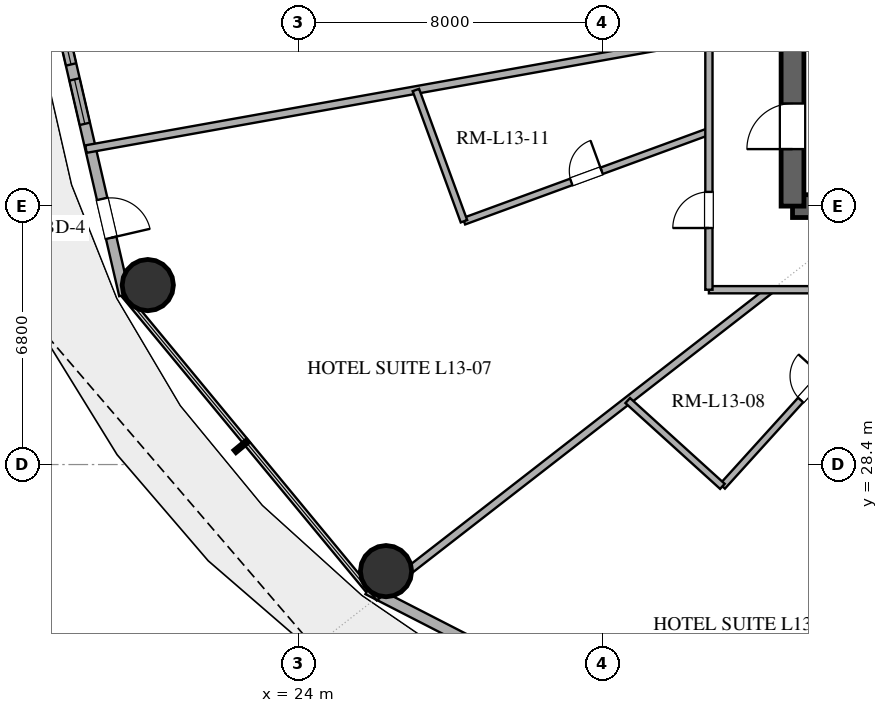
"""IFC4 building model, lengths in metres.
Left out: names, types, materials, properties, quantities, classifications, styles, units other than length and angle.
Written with IfcOpenShell. Run it as: python <this file> out.ifc"""

import sys

from ifc_helpers import new_model, si_unit, direction, frame, frame_2d, origin, origin_2d, place, context, subcontext, project, spatial, rectangle, hollow_circle, extrude, element, fill, save


model = new_model("IFC4")
c1 = context("Model", 3, precision=1e-05, world=origin(), true_north=direction((0.0, 1.0)))
c2 = subcontext(c1, "Body", "Model", "MODEL_VIEW")
j1 = project(units=[si_unit("LENGTHUNIT", "METRE"), si_unit("PLANEANGLEUNIT", "RADIAN")], contexts=[c1])
p1 = place(None, origin())
s1 = spatial("IfcSite", under=j1, at=p1, CompositionType="ELEMENT")
p2 = place(p1, origin())
s2 = spatial("IfcBuilding", under=s1, at=p2, CompositionType="ELEMENT")
p3 = place(p2, frame((0.0, 0.0, 57.0)))
s3 = spatial("IfcBuildingStorey", under=s2, at=p3, CompositionType="ELEMENT", Elevation=57.0)
p4 = place(p3, frame((37.0, 35.2, 0.0), z_axis=(0.0, 0.0, 1.0), x_axis=(1.0, 0.0, 0.0)))
e1 = element("IfcWall", 1, at=p4, inside=s3, PredefinedType="SHEAR", context=c2, shape_type="SweptSolid", body=[
    extrude(rectangle(XDim=4.0, YDim=0.6, at=frame_2d((2.0, 0.0))), origin(), (0.0, 0.0, 1.0), 3.38),
])
p5 = place(p3, frame((37.0, 35.2, 0.0), z_axis=(0.0, 0.0, 1.0), x_axis=(0.0, 1.0, 0.0)))
e2 = element("IfcWall", 2, at=p5, inside=s3, PredefinedType="SHEAR", context=c2, shape_type="SweptSolid", body=[
    extrude(rectangle(XDim=13.6, YDim=0.6, at=frame_2d((6.8, 0.0))), origin(), (0.0, 0.0, 1.0), 3.38),
])
p6 = place(p5, frame((1.5, 0.0, 0.0)))
e3 = element("IfcOpeningElement", 3, at=p6, cuts=e2, PredefinedType="OPENING", context=c2, shape_type="SweptSolid", body=[
    extrude(rectangle(XDim=1.2, YDim=2.15, at=frame_2d((0.6, 1.075))), frame((0.0, 0.31, 0.0), z_axis=(0.0, -1.0, 0.0), x_axis=(1.0, 0.0, 0.0)), (0.0, 0.0, 1.0), 0.62),
])
for number, where, z_axis, x_axis in (
    (4, (20.034, 33.122, 0.0), (0.0, 0.0, 1.0), (1.0, 0.0, 0.0)),
    (5, (26.303, 25.595, 0.0), (0.0, 0.0, 1.0), (1.0, 0.0, 0.0)),
):
    element("IfcColumn", number, at=place(p3, frame(where, z_axis=z_axis, x_axis=x_axis)), inside=s3, PredefinedType="COLUMN", context=c2, shape_type="SweptSolid", body=[
        extrude(hollow_circle(Radius=0.675, WallThickness=0.036, at=origin_2d()), origin(), (0.0, 0.0, 1.0), 3.38),
    ])
p7 = place(p3, frame((17.304, 42.0, 0.0), z_axis=(0.0, 0.0, 1.0), x_axis=(0.225454452941, -0.974253709076, 0.0)))
e6 = element("IfcWall", 6, at=p7, inside=s3, PredefinedType="SOLIDWALL", context=c2, shape_type="SweptSolid", body=[
    extrude(rectangle(XDim=9.38, YDim=0.28, at=frame_2d((4.69, 0.0))), origin(), (0.0, 0.0, 1.0), 3.38),
])
p8 = place(p7, frame((1.953, 0.0, 0.85)))
e7 = element("IfcOpeningElement", 7, at=p8, cuts=e6, PredefinedType="OPENING", context=c2, shape_type="SweptSolid", body=[
    extrude(rectangle(XDim=1.2, YDim=1.8, at=frame_2d((0.6, 0.9))), frame((0.0, 0.15, 0.0), z_axis=(0.0, -1.0, 0.0), x_axis=(1.0, 0.0, 0.0)), (0.0, 0.0, 1.0), 0.3),
])
p9 = place(p7, frame((3.558, 0.0, 0.85)))
e8 = element("IfcOpeningElement", 8, at=p9, cuts=e6, PredefinedType="OPENING", context=c2, shape_type="SweptSolid", body=[
    extrude(rectangle(XDim=1.2, YDim=1.8, at=frame_2d((0.6, 0.9))), frame((0.0, 0.15, 0.0), z_axis=(0.0, -1.0, 0.0), x_axis=(1.0, 0.0, 0.0)), (0.0, 0.0, 1.0), 0.3),
])
p10 = place(p7, frame((6.785, 0.0, 0.0)))
e9 = element("IfcOpeningElement", 9, at=p10, cuts=e6, PredefinedType="OPENING", context=c2, shape_type="SweptSolid", body=[
    extrude(rectangle(XDim=1.05, YDim=2.2, at=frame_2d((0.525, 1.1))), frame((0.0, 0.15, 0.0), z_axis=(0.0, -1.0, 0.0), x_axis=(1.0, 0.0, 0.0)), (0.0, 0.0, 1.0), 0.3),
])
p11 = place(p3, frame((25.826, 25.114, 0.0), z_axis=(0.0, 0.0, 1.0), x_axis=(0.889853976658, -0.456245438581, 0.0)))
e10 = element("IfcWall", 10, at=p11, inside=s3, PredefinedType="SOLIDWALL", context=c2, shape_type="SweptSolid", body=[
    extrude(rectangle(XDim=11.346, YDim=0.28, at=frame_2d((5.673, 0.0))), origin(), (0.0, 0.0, 1.0), 3.38),
])
p12 = place(p11, frame((2.967, 0.0, 0.85)))
e11 = element("IfcOpeningElement", 11, at=p12, cuts=e10, PredefinedType="OPENING", context=c2, shape_type="SweptSolid", body=[
    extrude(rectangle(XDim=2.1, YDim=2.2, at=frame_2d((1.05, 1.1))), frame((0.0, 0.15, 0.0), z_axis=(0.0, -1.0, 0.0), x_axis=(1.0, 0.0, 0.0)), (0.0, 0.0, 1.0), 0.3),
])
p13 = place(p11, frame((6.429, 0.0, 0.85)))
e12 = element("IfcOpeningElement", 12, at=p13, cuts=e10, PredefinedType="OPENING", context=c2, shape_type="SweptSolid", body=[
    extrude(rectangle(XDim=2.1, YDim=2.2, at=frame_2d((1.05, 1.1))), frame((0.0, 0.15, 0.0), z_axis=(0.0, -1.0, 0.0), x_axis=(1.0, 0.0, 0.0)), (0.0, 0.0, 1.0), 0.3),
])
p14 = place(p3, frame((34.8, 39.636, 0.0), z_axis=(0.0, 0.0, 1.0), x_axis=(-0.984338200058, -0.176290407871, 0.0)))
e13 = element("IfcWall", 13, at=p14, inside=s3, PredefinedType="PARTITIONING", context=c2, shape_type="SweptSolid", body=[
    extrude(rectangle(XDim=16.653, YDim=0.2, at=frame_2d((8.327, 0.0))), origin(), (0.0, 0.0, 1.0), 2.74),
])
p15 = place(p3, frame((36.417, 33.0, 0.0), z_axis=(0.0, 0.0, 1.0), x_axis=(-0.789656987139, -0.613548565855, 0.0)))
e14 = element("IfcWall", 14, at=p15, inside=s3, PredefinedType="PARTITIONING", context=c2, shape_type="SweptSolid", body=[
    extrude(rectangle(XDim=13.195, YDim=0.2, at=frame_2d((6.597, 0.0))), origin(), (0.0, 0.0, 1.0), 2.74),
])
p16 = place(p3, frame((35.155, 27.826, 0.0), z_axis=(0.0, 0.0, 1.0), x_axis=(0.671533822983, 0.740973902773, 0.0)))
e15 = element("IfcWall", 15, at=p16, inside=s3, PredefinedType="PLUMBINGWALL", context=c2, shape_type="SweptSolid", body=[
    extrude(rectangle(XDim=6.982, YDim=0.18, at=frame_2d((3.491, 0.0))), origin(), (0.0, 0.0, 1.0), 2.74),
])
p17 = place(p16, frame((3.066, 0.0, 0.0)))
e16 = element("IfcOpeningElement", 16, at=p17, cuts=e15, PredefinedType="OPENING", context=c2, shape_type="SweptSolid", body=[
    extrude(rectangle(XDim=0.85, YDim=2.1, at=frame_2d((0.425, 1.05))), frame((0.0, 0.1, 0.0), z_axis=(0.0, -1.0, 0.0), x_axis=(1.0, 0.0, 0.0)), (0.0, 0.0, 1.0), 0.2),
])
p18 = place(p3, frame((28.354, 34.802, 0.0), z_axis=(0.0, 0.0, 1.0), x_axis=(0.938953689431, 0.344043556986, 0.0)))
e17 = element("IfcWall", 17, at=p18, inside=s3, PredefinedType="PLUMBINGWALL", context=c2, shape_type="SweptSolid", body=[
    extrude(rectangle(XDim=6.865, YDim=0.18, at=frame_2d((3.433, 0.0))), origin(), (0.0, 0.0, 1.0), 2.74),
])
p19 = place(p18, frame((3.007, 0.0, 0.0)))
e18 = element("IfcOpeningElement", 18, at=p19, cuts=e17, PredefinedType="OPENING", context=c2, shape_type="SweptSolid", body=[
    extrude(rectangle(XDim=0.85, YDim=2.1, at=frame_2d((0.425, 1.05))), frame((0.0, 0.1, 0.0), z_axis=(0.0, -1.0, 0.0), x_axis=(1.0, 0.0, 0.0)), (0.0, 0.0, 1.0), 0.2),
])
p20 = place(p3, frame((50.144, 33.0, 0.0), z_axis=(0.0, 0.0, 1.0), x_axis=(-1.0, 0.0, 0.0)))
e19 = element("IfcWall", 19, at=p20, inside=s3, PredefinedType="PARTITIONING", context=c2, shape_type="SweptSolid", body=[
    extrude(rectangle(XDim=15.344, YDim=0.19, at=frame_2d((7.672, 0.0))), origin(), (0.0, 0.0, 1.0), 2.74),
])
p21 = place(p20, frame((3.438, 0.0, 0.0)))
e20 = element("IfcOpeningElement", 20, at=p21, cuts=e19, PredefinedType="OPENING", context=c2, shape_type="SweptSolid", body=[
    extrude(rectangle(XDim=1.0, YDim=2.2, at=frame_2d((0.5, 1.1))), frame((0.0, 0.105, 0.0), z_axis=(0.0, -1.0, 0.0), x_axis=(1.0, 0.0, 0.0)), (0.0, 0.0, 1.0), 0.21),
])
p22 = place(p20, frame((7.798, 0.0, 0.0)))
e21 = element("IfcOpeningElement", 21, at=p22, cuts=e19, PredefinedType="OPENING", context=c2, shape_type="SweptSolid", body=[
    extrude(rectangle(XDim=0.95, YDim=2.15, at=frame_2d((0.475, 1.075))), frame((0.0, 0.105, 0.0), z_axis=(0.0, -1.0, 0.0), x_axis=(1.0, 0.0, 0.0)), (0.0, 0.0, 1.0), 0.21),
])
p23 = place(p3, frame((34.8, 33.0, 0.0), z_axis=(0.0, 0.0, 1.0), x_axis=(0.0, 1.0, 0.0)))
e22 = element("IfcWall", 22, at=p23, inside=s3, PredefinedType="PARTITIONING", context=c2, shape_type="SweptSolid", body=[
    extrude(rectangle(XDim=6.668, YDim=0.19, at=frame_2d((3.334, 0.0))), origin(), (0.0, 0.0, 1.0), 2.74),
])
p24 = place(p23, frame((1.624, 0.0, 0.0)))
e23 = element("IfcOpeningElement", 23, at=p24, cuts=e22, PredefinedType="OPENING", context=c2, shape_type="SweptSolid", body=[
    extrude(rectangle(XDim=0.95, YDim=2.15, at=frame_2d((0.475, 1.075))), frame((0.0, 0.105, 0.0), z_axis=(0.0, -1.0, 0.0), x_axis=(1.0, 0.0, 0.0)), (0.0, 0.0, 1.0), 0.21),
])
p25 = place(p3, frame((27.089, 38.255, 0.0), z_axis=(0.0, 0.0, 1.0), x_axis=(0.344012760863, -0.938964972916, 0.0)))
e24 = element("IfcWall", 24, at=p25, inside=s3, PredefinedType="PLUMBINGWALL", context=c2, shape_type="SweptSolid", body=[
    extrude(rectangle(XDim=3.677, YDim=0.18, at=frame_2d((1.839, 0.0))), origin(), (0.0, 0.0, 1.0), 2.74),
])
p26 = place(p3, frame((32.664, 30.084, 0.0), z_axis=(0.0, 0.0, 1.0), x_axis=(0.740964368308, -0.67154434321, 0.0)))
e25 = element("IfcWall", 25, at=p26, inside=s3, PredefinedType="PLUMBINGWALL", context=c2, shape_type="SweptSolid", body=[
    extrude(rectangle(XDim=3.362, YDim=0.18, at=frame_2d((1.681, 0.0))), origin(), (0.0, 0.0, 1.0), 2.74),
])
p27 = place(p8, origin())
e26 = element("IfcWindow", 26, at=p27, inside=s3, PartitioningType="SINGLE_PANEL", PredefinedType="WINDOW", context=c2, shape_type="SweptSolid", body=[
    extrude(rectangle(XDim=1.2, YDim=1.8, at=frame_2d((0.6, 0.9))), frame((0.0, 0.03, 0.0), z_axis=(0.0, -1.0, 0.0), x_axis=(1.0, 0.0, 0.0)), (0.0, 0.0, 1.0), 0.06),
])
fill(e7, e26)
p28 = place(p9, origin())
e27 = element("IfcWindow", 27, at=p28, inside=s3, PartitioningType="SINGLE_PANEL", PredefinedType="WINDOW", context=c2, shape_type="SweptSolid", body=[
    extrude(rectangle(XDim=1.2, YDim=1.8, at=frame_2d((0.6, 0.9))), frame((0.0, 0.03, 0.0), z_axis=(0.0, -1.0, 0.0), x_axis=(1.0, 0.0, 0.0)), (0.0, 0.0, 1.0), 0.06),
])
fill(e8, e27)
p29 = place(p10, origin())
e28 = element("IfcDoor", 28, at=p29, inside=s3, OperationType="SINGLE_SWING_RIGHT", PredefinedType="DOOR", context=c2, shape_type="SweptSolid", body=[
    extrude(rectangle(XDim=1.05, YDim=2.2, at=frame_2d((0.525, 1.1))), frame((0.0, 0.025, 0.0), z_axis=(0.0, -1.0, 0.0), x_axis=(1.0, 0.0, 0.0)), (0.0, 0.0, 1.0), 0.05),
])
fill(e9, e28)
p30 = place(p6, origin())
e29 = element("IfcDoor", 29, at=p30, inside=s3, OperationType="SINGLE_SWING_LEFT", PredefinedType="DOOR", context=c2, shape_type="SweptSolid", body=[
    extrude(rectangle(XDim=1.2, YDim=2.15, at=frame_2d((0.6, 1.075))), frame((0.0, 0.025, 0.0), z_axis=(0.0, -1.0, 0.0), x_axis=(1.0, 0.0, 0.0)), (0.0, 0.0, 1.0), 0.05),
])
fill(e3, e29)
p31 = place(p17, origin())
e30 = element("IfcDoor", 30, at=p31, inside=s3, OperationType="SINGLE_SWING_RIGHT", PredefinedType="DOOR", context=c2, shape_type="SweptSolid", body=[
    extrude(rectangle(XDim=0.85, YDim=2.1, at=frame_2d((0.425, 1.05))), frame((0.0, 0.025, 0.0), z_axis=(0.0, -1.0, 0.0), x_axis=(1.0, 0.0, 0.0)), (0.0, 0.0, 1.0), 0.05),
])
fill(e16, e30)
p32 = place(p19, origin())
e31 = element("IfcDoor", 31, at=p32, inside=s3, OperationType="SINGLE_SWING_RIGHT", PredefinedType="DOOR", context=c2, shape_type="SweptSolid", body=[
    extrude(rectangle(XDim=0.85, YDim=2.1, at=frame_2d((0.425, 1.05))), frame((0.0, 0.025, 0.0), z_axis=(0.0, -1.0, 0.0), x_axis=(1.0, 0.0, 0.0)), (0.0, 0.0, 1.0), 0.05),
])
fill(e18, e31)
p33 = place(p24, origin())
e32 = element("IfcDoor", 32, at=p33, inside=s3, OperationType="SINGLE_SWING_LEFT", PredefinedType="DOOR", context=c2, shape_type="SweptSolid", body=[
    extrude(rectangle(XDim=0.95, YDim=2.15, at=frame_2d((0.475, 1.075))), frame((0.0, 0.025, 0.0), z_axis=(0.0, -1.0, 0.0), x_axis=(1.0, 0.0, 0.0)), (0.0, 0.0, 1.0), 0.05),
])
fill(e23, e32)
save(model, sys.argv[1])
